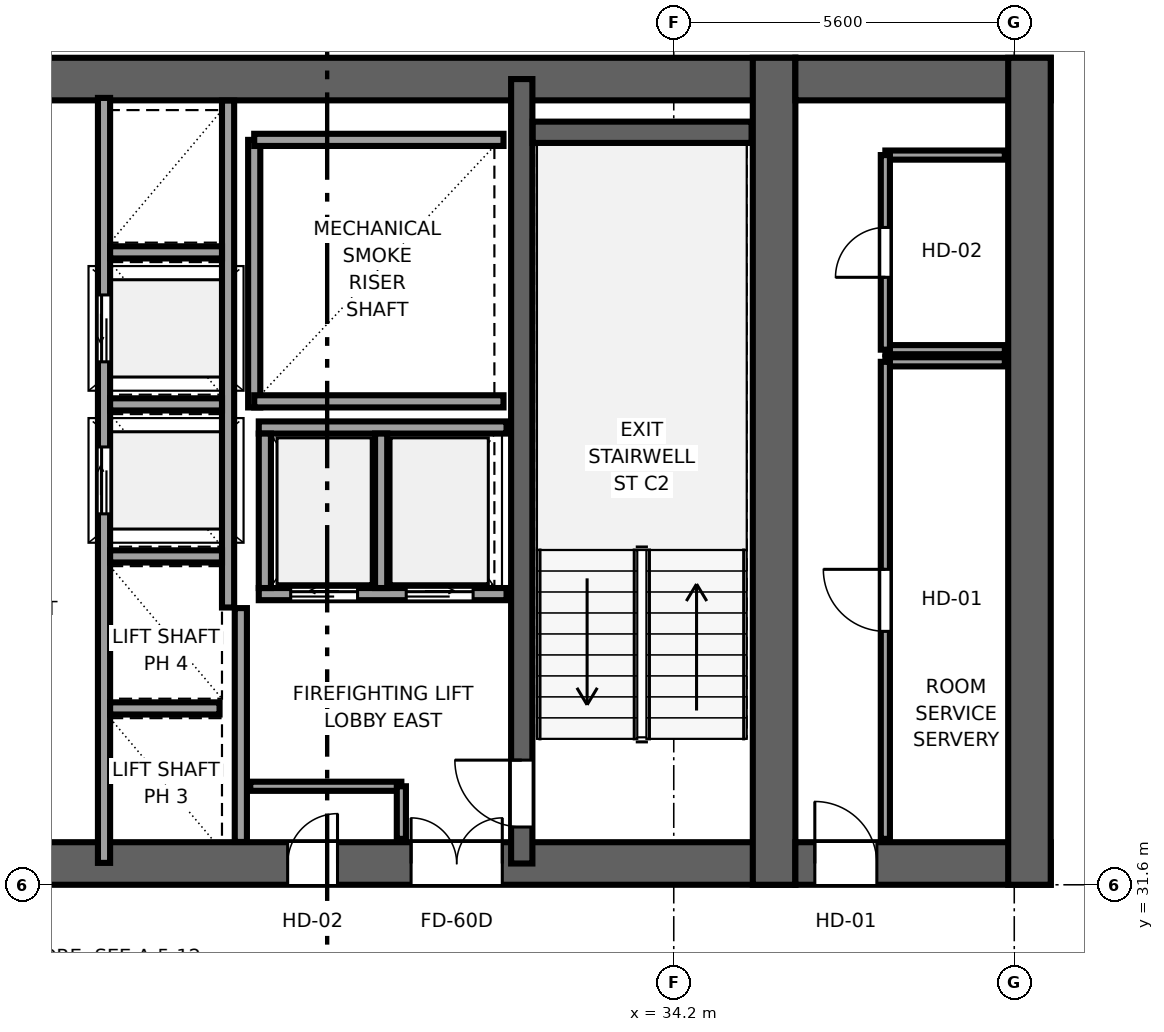
"""IFC4 building model, lengths in metres.
Left out: names, types, materials, properties, quantities, classifications, styles, units other than length and angle.
Written with IfcOpenShell. Run it as: python <this file> out.ifc"""

import sys

from ifc_helpers import new_model, si_unit, direction, frame, frame_2d, origin, place, context, subcontext, project, spatial, rectangle, extrude, source, transform, mapped, element, fill, save


model = new_model("IFC4")
c1 = context("Model", 3, precision=1e-05, world=origin(), true_north=direction((0.0, 1.0)))
c2 = subcontext(c1, "Body", "Model", "MODEL_VIEW")
j1 = project(units=[si_unit("LENGTHUNIT", "METRE"), si_unit("PLANEANGLEUNIT", "RADIAN")], contexts=[c1])
p1 = place(None, origin())
s1 = spatial("IfcSite", under=j1, at=p1, CompositionType="ELEMENT")
p2 = place(p1, origin())
s2 = spatial("IfcBuilding", under=s1, at=p2, CompositionType="ELEMENT")
p3 = place(p2, frame((0.0, 0.0, 168.35)))
s3 = spatial("IfcBuildingStorey", under=s2, at=p3, CompositionType="ELEMENT", Elevation=168.35)
p4 = place(p3, frame((9.8, 31.95, 0.0), z_axis=(0.0, 0.0, 1.0), x_axis=(1.0, 0.0, 0.0)))
e1 = element("IfcWall", 1, at=p4, inside=s3, PredefinedType="SHEAR", context=c2, shape_type="SweptSolid", body=[
    extrude(rectangle(XDim=26.4, YDim=0.7, at=frame_2d((13.2, 0.0))), origin(), (0.0, 0.0, 1.0), 3.55),
])
p5 = place(p4, frame((6.32, 0.0, 0.0), z_axis=(0.0, 0.0, 1.0), x_axis=(-1.0, 0.0, 0.0)))
e2 = element("IfcOpeningElement", 2, at=p5, cuts=e1, PredefinedType="OPENING", context=c2, shape_type="SweptSolid", body=[
    extrude(rectangle(XDim=1.5, YDim=2.04, at=frame_2d((0.75, 1.02))), frame((0.0, 0.36, 0.0), z_axis=(0.0, -1.0, 0.0), x_axis=(1.0, 0.0, 0.0)), (0.0, 0.0, 1.0), 0.72),
])
p6 = place(p4, frame((13.95, 0.0, 0.0), z_axis=(0.0, 0.0, 1.0), x_axis=(-1.0, 0.0, 0.0)))
e3 = element("IfcOpeningElement", 3, at=p6, cuts=e1, PredefinedType="OPENING", context=c2, shape_type="SweptSolid", body=[
    extrude(rectangle(XDim=1.5, YDim=2.04, at=frame_2d((0.75, 1.02))), frame((0.0, 0.36, 0.0), z_axis=(0.0, -1.0, 0.0), x_axis=(1.0, 0.0, 0.0)), (0.0, 0.0, 1.0), 0.72),
])
p7 = place(p4, frame((21.58, 0.0, 0.0), z_axis=(0.0, 0.0, 1.0), x_axis=(-1.0, 0.0, 0.0)))
e4 = element("IfcOpeningElement", 4, at=p7, cuts=e1, PredefinedType="OPENING", context=c2, shape_type="SweptSolid", body=[
    extrude(rectangle(XDim=1.5, YDim=2.04, at=frame_2d((0.75, 1.02))), frame((0.0, 0.36, 0.0), z_axis=(0.0, -1.0, 0.0), x_axis=(1.0, 0.0, 0.0)), (0.0, 0.0, 1.0), 0.72),
])
p8 = place(p4, frame((8.37, 0.0, 0.0), z_axis=(0.0, 0.0, 1.0), x_axis=(-1.0, 0.0, 0.0)))
e5 = element("IfcOpeningElement", 5, at=p8, cuts=e1, PredefinedType="OPENING", context=c2, shape_type="SweptSolid", body=[
    extrude(rectangle(XDim=0.82, YDim=2.01, at=frame_2d((0.41, 1.005))), frame((0.0, 0.36, 0.0), z_axis=(0.0, -1.0, 0.0), x_axis=(1.0, 0.0, 0.0)), (0.0, 0.0, 1.0), 0.72),
])
p9 = place(p4, frame((18.87, 0.0, 0.0), z_axis=(0.0, 0.0, 1.0), x_axis=(-1.0, 0.0, 0.0)))
e6 = element("IfcOpeningElement", 6, at=p9, cuts=e1, PredefinedType="OPENING", context=c2, shape_type="SweptSolid", body=[
    extrude(rectangle(XDim=0.82, YDim=2.01, at=frame_2d((0.41, 1.005))), frame((0.0, 0.36, 0.0), z_axis=(0.0, -1.0, 0.0), x_axis=(1.0, 0.0, 0.0)), (0.0, 0.0, 1.0), 0.72),
])
p10 = place(p3, frame((9.8, 44.85, 0.0), z_axis=(0.0, 0.0, 1.0), x_axis=(1.0, 0.0, 0.0)))
e7 = element("IfcWall", 7, at=p10, inside=s3, PredefinedType="SHEAR", context=c2, shape_type="SweptSolid", body=[
    extrude(rectangle(XDim=26.4, YDim=0.7, at=frame_2d((13.2, 0.0))), origin(), (0.0, 0.0, 1.0), 3.55),
])
p11 = place(p3, frame((35.85, 31.6, 0.0), z_axis=(0.0, 0.0, 1.0), x_axis=(0.0, 1.0, 0.0)))
e8 = element("IfcWall", 8, at=p11, inside=s3, PredefinedType="SHEAR", context=c2, shape_type="SweptSolid", body=[
    extrude(rectangle(XDim=13.6, YDim=0.7, at=frame_2d((6.8, 0.0))), origin(), (0.0, 0.0, 1.0), 3.55),
])
p12 = place(p3, frame((31.7, 31.95, 0.0), z_axis=(0.0, 0.0, 1.0), x_axis=(0.0, 1.0, 0.0)))
e9 = element("IfcWall", 9, at=p12, inside=s3, PredefinedType="SHEAR", context=c2, shape_type="SweptSolid", body=[
    extrude(rectangle(XDim=12.9, YDim=0.35, at=frame_2d((6.45, 0.0))), origin(), (0.0, 0.0, 1.0), 3.55),
])
p13 = place(p12, frame((1.7, 0.0, 0.0), z_axis=(0.0, 0.0, 1.0), x_axis=(-1.0, 0.0, 0.0)))
e10 = element("IfcOpeningElement", 10, at=p13, cuts=e9, PredefinedType="OPENING", context=c2, shape_type="SweptSolid", body=[
    extrude(rectangle(XDim=1.1, YDim=2.12, at=frame_2d((0.55, 1.06))), frame((0.0, 0.185, 0.0), z_axis=(0.0, -1.0, 0.0), x_axis=(1.0, 0.0, 0.0)), (0.0, 0.0, 1.0), 0.37),
])
p14 = place(p3, frame((36.2, 31.95, 0.0), z_axis=(0.0, 0.0, 1.0), x_axis=(1.0, 0.0, 0.0)))
e11 = element("IfcWall", 11, at=p14, inside=s3, PredefinedType="SHEAR", context=c2, shape_type="SweptSolid", body=[
    extrude(rectangle(XDim=4.2, YDim=0.7, at=frame_2d((2.1, 0.0))), origin(), (0.0, 0.0, 1.0), 3.55),
])
p15 = place(p14, frame((1.34, 0.0, 0.0), z_axis=(0.0, 0.0, 1.0), x_axis=(-1.0, 0.0, 0.0)))
e12 = element("IfcOpeningElement", 12, at=p15, cuts=e11, PredefinedType="OPENING", context=c2, shape_type="SweptSolid", body=[
    extrude(rectangle(XDim=1.02, YDim=2.03, at=frame_2d((0.51, 1.015))), frame((0.0, 0.36, 0.0), z_axis=(0.0, -1.0, 0.0), x_axis=(1.0, 0.0, 0.0)), (0.0, 0.0, 1.0), 0.72),
])
p16 = place(p3, frame((36.2, 44.85, 0.0), z_axis=(0.0, 0.0, 1.0), x_axis=(1.0, 0.0, 0.0)))
e13 = element("IfcWall", 13, at=p16, inside=s3, PredefinedType="SHEAR", context=c2, shape_type="SweptSolid", body=[
    extrude(rectangle(XDim=4.2, YDim=0.7, at=frame_2d((2.1, 0.0))), origin(), (0.0, 0.0, 1.0), 3.55),
])
p17 = place(p3, frame((40.05, 31.6, 0.0), z_axis=(0.0, 0.0, 1.0), x_axis=(0.0, 1.0, 0.0)))
e14 = element("IfcWall", 14, at=p17, inside=s3, PredefinedType="SHEAR", context=c2, shape_type="SweptSolid", body=[
    extrude(rectangle(XDim=13.6, YDim=0.7, at=frame_2d((6.8, 0.0))), origin(), (0.0, 0.0, 1.0), 3.55),
])
p18 = place(p3, frame((31.88, 43.975, 0.0), z_axis=(0.0, 0.0, 1.0), x_axis=(1.0, 0.0, 0.0)))
e15 = element("IfcWall", 15, at=p18, inside=s3, PredefinedType="SHEAR", context=c2, shape_type="SweptSolid", body=[
    extrude(rectangle(XDim=3.6, YDim=0.35, at=frame_2d((1.8, 0.0))), origin(), (0.0, 0.0, 1.0), 3.55),
])
p19 = place(p3, frame((27.3, 39.45, 0.0), z_axis=(0.0, 0.0, 1.0), x_axis=(0.0, 1.0, 0.0)))
e16 = element("IfcWall", 16, at=p19, inside=s3, PredefinedType="SOLIDWALL", context=c2, shape_type="SweptSolid", body=[
    extrude(rectangle(XDim=4.4, YDim=0.2, at=frame_2d((2.2, 0.0))), origin(), (0.0, 0.0, 1.0), 3.37),
])
for number, where, z_axis, x_axis in (
    (17, (27.3, 39.55, 0.0), (0.0, 0.0, 1.0), (1.0, 0.0, 0.0)),
    (18, (27.3, 43.85, 0.0), (0.0, 0.0, 1.0), (1.0, 0.0, 0.0)),
):
    element("IfcWall", number, at=place(p3, frame(where, z_axis=z_axis, x_axis=x_axis)), inside=s3, PredefinedType="SOLIDWALL", context=c2, shape_type="SweptSolid", body=[
        extrude(rectangle(XDim=4.1, YDim=0.2, at=frame_2d((2.05, 0.0))), origin(), (0.0, 0.0, 1.0), 3.37),
    ])
p20 = place(p3, frame((27.08, 32.304, 0.0), z_axis=(0.0, 0.0, 1.0), x_axis=(0.0, 1.0, 0.0)))
e19 = element("IfcWall", 19, at=p20, inside=s3, PredefinedType="SOLIDWALL", context=c2, shape_type="SweptSolid", body=[
    extrude(rectangle(XDim=3.846, YDim=0.2, at=frame_2d((1.923, 0.0))), origin(), (0.0, 0.0, 1.0), 3.37),
])
p21 = place(p3, frame((27.375, 36.38, 0.0), z_axis=(0.0, 0.0, 1.0), x_axis=(1.0, 0.0, 0.0)))
e20 = element("IfcWall", 20, at=p21, inside=s3, PredefinedType="SOLIDWALL", context=c2, shape_type="SweptSolid", body=[
    extrude(rectangle(XDim=4.075, YDim=0.2, at=frame_2d((2.038, 0.0))), origin(), (0.0, 0.0, 1.0), 3.37),
])
p22 = place(p21, frame((0.525, 0.0, 0.0)))
e21 = element("IfcOpeningElement", 21, at=p22, cuts=e20, PredefinedType="OPENING", context=c2, shape_type="SweptSolid", body=[
    extrude(rectangle(XDim=1.1, YDim=2.12, at=frame_2d((0.55, 1.06))), frame((0.0, 0.11, 0.0), z_axis=(0.0, -1.0, 0.0), x_axis=(1.0, 0.0, 0.0)), (0.0, 0.0, 1.0), 0.22),
])
p23 = place(p21, frame((2.425, 0.0, 0.0)))
e22 = element("IfcOpeningElement", 22, at=p23, cuts=e20, PredefinedType="OPENING", context=c2, shape_type="SweptSolid", body=[
    extrude(rectangle(XDim=1.1, YDim=2.12, at=frame_2d((0.55, 1.06))), frame((0.0, 0.11, 0.0), z_axis=(0.0, -1.0, 0.0), x_axis=(1.0, 0.0, 0.0)), (0.0, 0.0, 1.0), 0.22),
])
p24 = place(p3, frame((27.375, 39.12, 0.0), z_axis=(0.0, 0.0, 1.0), x_axis=(1.0, 0.0, 0.0)))
e23 = element("IfcWall", 23, at=p24, inside=s3, PredefinedType="SOLIDWALL", context=c2, shape_type="SweptSolid", body=[
    extrude(rectangle(XDim=4.075, YDim=0.2, at=frame_2d((2.038, 0.0))), origin(), (0.0, 0.0, 1.0), 3.37),
])
for number, where, z_axis, x_axis in (
    (24, (27.475, 36.48, 0.0), (0.0, 0.0, 1.0), (0.0, 1.0, 0.0)),
    (25, (29.387, 36.48, 0.0), (0.0, 0.0, 1.0), (0.0, 1.0, 0.0)),
):
    element("IfcWall", number, at=place(p3, frame(where, z_axis=z_axis, x_axis=x_axis)), inside=s3, PredefinedType="SOLIDWALL", context=c2, shape_type="SweptSolid", body=[
        extrude(rectangle(XDim=2.54, YDim=0.2, at=frame_2d((1.27, 0.0))), origin(), (0.0, 0.0, 1.0), 3.37),
    ])
p25 = place(p3, frame((24.83, 31.96, 0.0), z_axis=(0.0, 0.0, 1.0), x_axis=(0.0, 1.0, 0.0)))
e26 = element("IfcWall", 26, at=p25, inside=s3, PredefinedType="SOLIDWALL", context=c2, shape_type="SweptSolid", body=[
    extrude(rectangle(XDim=12.58, YDim=0.2, at=frame_2d((6.29, 0.0))), origin(), (0.0, 0.0, 1.0), 3.37),
])
p26 = place(p25, frame((5.74, 0.0, 0.0)))
e27 = element("IfcOpeningElement", 27, at=p26, cuts=e26, PredefinedType="OPENING", context=c2, shape_type="SweptSolid", body=[
    extrude(rectangle(XDim=1.1, YDim=2.12, at=frame_2d((0.55, 1.06))), frame((0.0, 0.11, 0.0), z_axis=(0.0, -1.0, 0.0), x_axis=(1.0, 0.0, 0.0)), (0.0, 0.0, 1.0), 0.22),
])
p27 = place(p25, frame((8.24, 0.0, 0.0)))
e28 = element("IfcOpeningElement", 28, at=p27, cuts=e26, PredefinedType="OPENING", context=c2, shape_type="SweptSolid", body=[
    extrude(rectangle(XDim=1.1, YDim=2.12, at=frame_2d((0.55, 1.06))), frame((0.0, 0.11, 0.0), z_axis=(0.0, -1.0, 0.0), x_axis=(1.0, 0.0, 0.0)), (0.0, 0.0, 1.0), 0.22),
])
p28 = place(p3, frame((26.87, 36.16, 0.0), z_axis=(0.0, 0.0, 1.0), x_axis=(0.0, 1.0, 0.0)))
e29 = element("IfcWall", 29, at=p28, inside=s3, PredefinedType="SOLIDWALL", context=c2, shape_type="SweptSolid", body=[
    extrude(rectangle(XDim=8.336, YDim=0.2, at=frame_2d((4.168, 0.0))), origin(), (0.0, 0.0, 1.0), 3.37),
])
p29 = place(p3, frame((24.93, 34.5, 0.0), z_axis=(0.0, 0.0, 1.0), x_axis=(1.0, 0.0, 0.0)))
e30 = element("IfcWall", 30, at=p29, inside=s3, PredefinedType="SOLIDWALL", context=c2, shape_type="SweptSolid", body=[
    extrude(rectangle(XDim=1.8, YDim=0.2, at=frame_2d((0.9, 0.0))), origin(), (0.0, 0.0, 1.0), 3.37),
])
for number, where, z_axis, x_axis in (
    (31, (24.93, 37.0, 0.0), (0.0, 0.0, 1.0), (1.0, 0.0, 0.0)),
    (32, (24.93, 39.5, 0.0), (0.0, 0.0, 1.0), (1.0, 0.0, 0.0)),
    (33, (24.93, 42.0, 0.0), (0.0, 0.0, 1.0), (1.0, 0.0, 0.0)),
):
    element("IfcWall", number, at=place(p3, frame(where, z_axis=z_axis, x_axis=x_axis)), inside=s3, PredefinedType="SOLIDWALL", context=c2, shape_type="SweptSolid", body=[
        extrude(rectangle(XDim=1.84, YDim=0.2, at=frame_2d((0.92, 0.0))), origin(), (0.0, 0.0, 1.0), 3.37),
    ])
p30 = place(p3, frame((27.235, 33.22, 0.0), z_axis=(0.0, 0.0, 1.0), x_axis=(1.0, 0.0, 0.0)))
e34 = element("IfcWall", 34, at=p30, inside=s3, PredefinedType="PARTITIONING", context=c2, shape_type="SweptSolid", body=[
    extrude(rectangle(XDim=2.485, YDim=0.15, at=frame_2d((1.242, 0.0))), origin(), (0.0, 0.0, 1.0), 3.37),
])
p31 = place(p3, frame((29.72, 32.355, 0.0), z_axis=(0.0, 0.0, 1.0), x_axis=(0.0, 1.0, 0.0)))
e35 = element("IfcWall", 35, at=p31, inside=s3, PredefinedType="PARTITIONING", context=c2, shape_type="SweptSolid", body=[
    extrude(rectangle(XDim=0.865, YDim=0.15, at=frame_2d((0.433, 0.0))), origin(), (0.0, 0.0, 1.0), 3.37),
])
p32 = place(p3, frame((37.68, 40.2, 0.0), z_axis=(0.0, 0.0, 1.0), x_axis=(1.0, 0.0, 0.0)))
e36 = element("IfcWall", 36, at=p32, inside=s3, PredefinedType="PARTITIONING", context=c2, shape_type="SweptSolid", body=[
    extrude(rectangle(XDim=1.965, YDim=0.15, at=frame_2d((0.982, 0.0))), origin(), (0.0, 0.0, 1.0), 3.37),
])
p33 = place(p3, frame((37.68, 32.355, 0.0), z_axis=(0.0, 0.0, 1.0), x_axis=(0.0, 1.0, 0.0)))
e37 = element("IfcWall", 37, at=p33, inside=s3, PredefinedType="PARTITIONING", context=c2, shape_type="SweptSolid", body=[
    extrude(rectangle(XDim=7.845, YDim=0.15, at=frame_2d((3.922, 0.0))), origin(), (0.0, 0.0, 1.0), 3.37),
])
p34 = place(p33, frame((3.413, 0.0, 0.0)))
e38 = element("IfcOpeningElement", 38, at=p34, cuts=e37, PredefinedType="OPENING", context=c2, shape_type="SweptSolid", body=[
    extrude(rectangle(XDim=1.02, YDim=2.03, at=frame_2d((0.51, 1.015))), frame((0.0, 0.085, 0.0), z_axis=(0.0, -1.0, 0.0), x_axis=(1.0, 0.0, 0.0)), (0.0, 0.0, 1.0), 0.17),
])
for number, where, z_axis, x_axis in (
    (39, (37.68, 40.4, 0.0), (0.0, 0.0, 1.0), (1.0, 0.0, 0.0)),
    (40, (37.68, 43.6, 0.0), (0.0, 0.0, 1.0), (1.0, 0.0, 0.0)),
):
    element("IfcWall", number, at=place(p3, frame(where, z_axis=z_axis, x_axis=x_axis)), inside=s3, PredefinedType="PARTITIONING", context=c2, shape_type="SweptSolid", body=[
        extrude(rectangle(XDim=1.965, YDim=0.15, at=frame_2d((0.982, 0.0))), origin(), (0.0, 0.0, 1.0), 3.37),
    ])
p35 = place(p3, frame((37.68, 40.4, 0.0), z_axis=(0.0, 0.0, 1.0), x_axis=(0.0, 1.0, 0.0)))
e41 = element("IfcWall", 41, at=p35, inside=s3, PredefinedType="PARTITIONING", context=c2, shape_type="SweptSolid", body=[
    extrude(rectangle(XDim=3.2, YDim=0.15, at=frame_2d((1.6, 0.0))), origin(), (0.0, 0.0, 1.0), 3.37),
])
p36 = place(p35, frame((1.19, 0.0, 0.0)))
e42 = element("IfcOpeningElement", 42, at=p36, cuts=e41, PredefinedType="OPENING", context=c2, shape_type="SweptSolid", body=[
    extrude(rectangle(XDim=0.82, YDim=2.01, at=frame_2d((0.41, 1.005))), frame((0.0, 0.085, 0.0), z_axis=(0.0, -1.0, 0.0), x_axis=(1.0, 0.0, 0.0)), (0.0, 0.0, 1.0), 0.17),
])
m1 = source(origin(), c2, "Body", "SweptSolid", [
    extrude(rectangle(XDim=1.1, YDim=2.12, at=frame_2d((0.55, 1.06))), frame((0.0, 0.025, 0.0), z_axis=(0.0, -1.0, 0.0), x_axis=(1.0, 0.0, 0.0)), (0.0, 0.0, 1.0), 0.05),
])
p37 = place(p13, origin())
e43 = element("IfcDoor", 43, at=p37, inside=s3, OperationType="SINGLE_SWING_RIGHT", PredefinedType="DOOR", context=c2, shape_type="MappedRepresentation", body=[
    mapped(m1, transform((0.0, 0.0, 0.0), x_axis=(1.0, 0.0, 0.0), y_axis=(0.0, 1.0, 0.0), z_axis=(0.0, 0.0, 1.0), scale=1.0)),
])
fill(e10, e43)
m2 = source(origin(), c2, "Body", "SweptSolid", [
    extrude(rectangle(XDim=1.5, YDim=2.04, at=frame_2d((0.75, 1.02))), frame((0.0, 0.025, 0.0), z_axis=(0.0, -1.0, 0.0), x_axis=(1.0, 0.0, 0.0)), (0.0, 0.0, 1.0), 0.05),
])
p38 = place(p7, origin())
e44 = element("IfcDoor", 44, at=p38, inside=s3, OperationType="DOUBLE_DOOR_SINGLE_SWING", PredefinedType="DOOR", context=c2, shape_type="MappedRepresentation", body=[
    mapped(m2, transform((0.0, 0.0, 0.0), x_axis=(1.0, 0.0, 0.0), y_axis=(0.0, 1.0, 0.0), z_axis=(0.0, 0.0, 1.0), scale=1.0)),
])
fill(e4, e44)
m3 = source(origin(), c2, "Body", "SweptSolid", [
    extrude(rectangle(XDim=0.82, YDim=2.01, at=frame_2d((0.41, 1.005))), frame((0.0, 0.025, 0.0), z_axis=(0.0, -1.0, 0.0), x_axis=(1.0, 0.0, 0.0)), (0.0, 0.0, 1.0), 0.05),
])
p39 = place(p9, origin())
e45 = element("IfcDoor", 45, at=p39, inside=s3, OperationType="SINGLE_SWING_RIGHT", PredefinedType="DOOR", context=c2, shape_type="MappedRepresentation", body=[
    mapped(m3, transform((0.0, 0.0, 0.0), x_axis=(1.0, 0.0, 0.0), y_axis=(0.0, 1.0, 0.0), z_axis=(0.0, 0.0, 1.0), scale=1.0)),
])
fill(e6, e45)
m4 = source(origin(), c2, "Body", "SweptSolid", [
    extrude(rectangle(XDim=1.02, YDim=2.03, at=frame_2d((0.51, 1.015))), frame((0.0, 0.025, 0.0), z_axis=(0.0, -1.0, 0.0), x_axis=(1.0, 0.0, 0.0)), (0.0, 0.0, 1.0), 0.05),
])
p40 = place(p15, origin())
e46 = element("IfcDoor", 46, at=p40, inside=s3, OperationType="SINGLE_SWING_LEFT", PredefinedType="DOOR", context=c2, shape_type="MappedRepresentation", body=[
    mapped(m4, transform((0.0, 0.0, 0.0), x_axis=(1.0, 0.0, 0.0), y_axis=(0.0, 1.0, 0.0), z_axis=(0.0, 0.0, 1.0), scale=1.0)),
])
fill(e12, e46)
m5 = source(origin(), c2, "Body", "SweptSolid", [
    extrude(rectangle(XDim=1.1, YDim=2.12, at=frame_2d((0.55, 1.06))), frame((0.0, 0.025, 0.0), z_axis=(0.0, -1.0, 0.0), x_axis=(1.0, 0.0, 0.0)), (0.0, 0.0, 1.0), 0.05),
])
p41 = place(p22, origin())
e47 = element("IfcDoor", 47, at=p41, inside=s3, OperationType="SLIDING_TO_LEFT", PredefinedType="DOOR", context=c2, shape_type="MappedRepresentation", body=[
    mapped(m5, transform((0.0, 0.0, 0.0), x_axis=(1.0, 0.0, 0.0), y_axis=(0.0, 1.0, 0.0), z_axis=(0.0, 0.0, 1.0), scale=1.0)),
])
fill(e21, e47)
p42 = place(p23, origin())
e48 = element("IfcDoor", 48, at=p42, inside=s3, OperationType="SLIDING_TO_RIGHT", PredefinedType="DOOR", context=c2, shape_type="MappedRepresentation", body=[
    mapped(m5, transform((0.0, 0.0, 0.0), x_axis=(1.0, 0.0, 0.0), y_axis=(0.0, 1.0, 0.0), z_axis=(0.0, 0.0, 1.0), scale=1.0)),
])
fill(e22, e48)
p43 = place(p26, origin())
e49 = element("IfcDoor", 49, at=p43, inside=s3, OperationType="SLIDING_TO_RIGHT", PredefinedType="DOOR", context=c2, shape_type="MappedRepresentation", body=[
    mapped(m5, transform((0.0, 0.0, 0.0), x_axis=(1.0, 0.0, 0.0), y_axis=(0.0, 1.0, 0.0), z_axis=(0.0, 0.0, 1.0), scale=1.0)),
])
fill(e27, e49)
p44 = place(p27, origin())
e50 = element("IfcDoor", 50, at=p44, inside=s3, OperationType="SLIDING_TO_LEFT", PredefinedType="DOOR", context=c2, shape_type="MappedRepresentation", body=[
    mapped(m5, transform((0.0, 0.0, 0.0), x_axis=(1.0, 0.0, 0.0), y_axis=(0.0, 1.0, 0.0), z_axis=(0.0, 0.0, 1.0), scale=1.0)),
])
fill(e28, e50)
p45 = place(p34, origin())
e51 = element("IfcDoor", 51, at=p45, inside=s3, OperationType="SINGLE_SWING_RIGHT", PredefinedType="DOOR", context=c2, shape_type="MappedRepresentation", body=[
    mapped(m4, transform((0.0, 0.0, 0.0), x_axis=(1.0, 0.0, 0.0), y_axis=(0.0, 1.0, 0.0), z_axis=(0.0, 0.0, 1.0), scale=1.0)),
])
fill(e38, e51)
p46 = place(p36, origin())
e52 = element("IfcDoor", 52, at=p46, inside=s3, OperationType="SINGLE_SWING_LEFT", PredefinedType="DOOR", context=c2, shape_type="MappedRepresentation", body=[
    mapped(m3, transform((0.0, 0.0, 0.0), x_axis=(1.0, 0.0, 0.0), y_axis=(0.0, 1.0, 0.0), z_axis=(0.0, 0.0, 1.0), scale=1.0)),
])
fill(e42, e52)
save(model, sys.argv[1])
